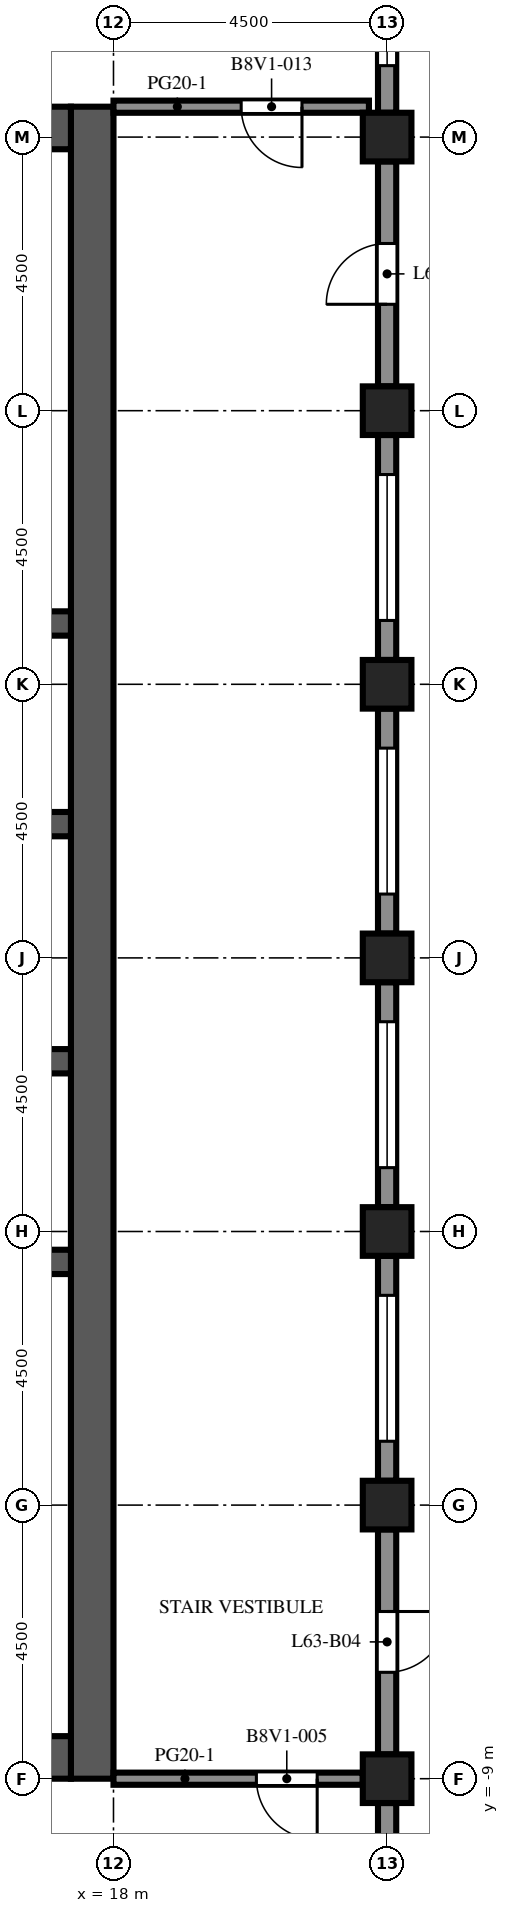
"""IFC4 building model, lengths in metres.
Left out: names, types, materials, properties, quantities, classifications, styles, units other than length and angle.
Written with IfcOpenShell. Run it as: python <this file> out.ifc"""

import sys

from ifc_helpers import new_model, si_unit, direction, frame, frame_2d, origin, origin_2d, place, context, subcontext, project, spatial, rectangle, extrude, element, fill, save


model = new_model("IFC4")
c1 = context("Model", 3, precision=1e-05, world=origin(), true_north=direction((0.0, 1.0)))
c2 = subcontext(c1, "Body", "Model", "MODEL_VIEW")
j1 = project(units=[si_unit("LENGTHUNIT", "METRE"), si_unit("PLANEANGLEUNIT", "RADIAN")], contexts=[c1])
p1 = place(None, origin())
s1 = spatial("IfcSite", under=j1, at=p1, CompositionType="ELEMENT")
p2 = place(p1, origin())
s2 = spatial("IfcBuilding", under=s1, at=p2, CompositionType="ELEMENT")
p3 = place(p2, frame((0.0, 0.0, 278.6)))
s3 = spatial("IfcBuildingStorey", under=s2, at=p3, CompositionType="ELEMENT", Elevation=278.6)
for number, where, z_axis, x_axis in (
    (1, (22.5, -9.0, 0.0), (0.0, 0.0, 1.0), (1.0, 0.0, 0.0)),
    (2, (22.5, -4.5, 0.0), (0.0, 0.0, 1.0), (1.0, 0.0, 0.0)),
    (3, (22.5, 0.0, 0.0), (0.0, 0.0, 1.0), (1.0, 0.0, 0.0)),
    (4, (22.5, 4.5, 0.0), (0.0, 0.0, 1.0), (1.0, 0.0, 0.0)),
    (5, (22.5, 9.0, 0.0), (0.0, 0.0, 1.0), (1.0, 0.0, 0.0)),
    (6, (22.5, 13.5, 0.0), (0.0, 0.0, 1.0), (1.0, 0.0, 0.0)),
    (7, (22.5, 18.0, 0.0), (0.0, 0.0, 1.0), (1.0, 0.0, 0.0)),
):
    element("IfcColumn", number, at=place(p3, frame(where, z_axis=z_axis, x_axis=x_axis)), inside=s3, PredefinedType="COLUMN", context=c2, shape_type="SweptSolid", body=[
        extrude(rectangle(XDim=0.8, YDim=0.8, at=origin_2d()), origin(), (0.0, 0.0, 1.0), 4.1),
    ])
p4 = place(p3, frame((17.65, -9.0, 0.0), z_axis=(0.0, 0.0, 1.0), x_axis=(0.0, 1.0, 0.0)))
e8 = element("IfcWall", 8, at=p4, inside=s3, PredefinedType="SHEAR", context=c2, shape_type="SweptSolid", body=[
    extrude(rectangle(XDim=27.5, YDim=0.7, at=frame_2d((13.75, 0.0))), origin(), (0.0, 0.0, 1.0), 4.1),
])
p5 = place(p4, frame((12.55, 0.0, 0.0)))
e9 = element("IfcOpeningElement", 9, at=p5, cuts=e8, PredefinedType="OPENING", context=c2, shape_type="SweptSolid", body=[
    extrude(rectangle(XDim=2.4, YDim=2.4, at=frame_2d((1.2, 1.2))), frame((0.0, 0.36, 0.0), z_axis=(0.0, -1.0, 0.0), x_axis=(1.0, 0.0, 0.0)), (0.0, 0.0, 1.0), 0.72),
])
p6 = place(p4, frame((6.825, 0.0, 0.0)))
e10 = element("IfcOpeningElement", 10, at=p6, cuts=e8, PredefinedType="OPENING", context=c2, shape_type="SweptSolid", body=[
    extrude(rectangle(XDim=1.2, YDim=2.1, at=frame_2d((0.6, 1.05))), frame((0.0, 0.36, 0.0), z_axis=(0.0, -1.0, 0.0), x_axis=(1.0, 0.0, 0.0)), (0.0, 0.0, 1.0), 0.72),
])
p7 = place(p4, frame((19.475, 0.0, 0.0)))
e11 = element("IfcOpeningElement", 11, at=p7, cuts=e8, PredefinedType="OPENING", context=c2, shape_type="SweptSolid", body=[
    extrude(rectangle(XDim=1.2, YDim=2.1, at=frame_2d((0.6, 1.05))), frame((0.0, 0.36, 0.0), z_axis=(0.0, -1.0, 0.0), x_axis=(1.0, 0.0, 0.0)), (0.0, 0.0, 1.0), 0.72),
])
for number, where, z_axis, x_axis in (
    (12, (6.7, -8.65, 0.0), (0.0, 0.0, 1.0), (1.0, 0.0, 0.0)),
    (13, (6.7, 18.15, 0.0), (0.0, 0.0, 1.0), (1.0, 0.0, 0.0)),
):
    element("IfcWall", number, at=place(p3, frame(where, z_axis=z_axis, x_axis=x_axis)), inside=s3, PredefinedType="SHEAR", context=c2, shape_type="SweptSolid", body=[
        extrude(rectangle(XDim=10.6, YDim=0.7, at=frame_2d((5.3, 0.0))), origin(), (0.0, 0.0, 1.0), 4.1),
    ])
p8 = place(p3, frame((6.7, -0.5, 0.0), z_axis=(0.0, 0.0, 1.0), x_axis=(1.0, 0.0, 0.0)))
e14 = element("IfcWall", 14, at=p8, inside=s3, PredefinedType="SHEAR", context=c2, shape_type="SweptSolid", body=[
    extrude(rectangle(XDim=10.6, YDim=0.4, at=frame_2d((5.3, 0.0))), origin(), (0.0, 0.0, 1.0), 4.1),
])
p9 = place(p3, frame((6.7, 2.8, 0.0), z_axis=(0.0, 0.0, 1.0), x_axis=(1.0, 0.0, 0.0)))
e15 = element("IfcWall", 15, at=p9, inside=s3, PredefinedType="SHEAR", context=c2, shape_type="SweptSolid", body=[
    extrude(rectangle(XDim=10.6, YDim=0.4, at=frame_2d((5.3, 0.0))), origin(), (0.0, 0.0, 1.0), 4.1),
])
p10 = place(p9, frame((0.688, 0.0, 0.0)))
e16 = element("IfcOpeningElement", 16, at=p10, cuts=e15, PredefinedType="OPENING", context=c2, shape_type="SweptSolid", body=[
    extrude(rectangle(XDim=1.1, YDim=2.1, at=frame_2d((0.55, 1.05))), frame((0.0, 0.21, 0.0), z_axis=(0.0, -1.0, 0.0), x_axis=(1.0, 0.0, 0.0)), (0.0, 0.0, 1.0), 0.42),
])
p11 = place(p9, frame((3.438, 0.0, 0.0)))
e17 = element("IfcOpeningElement", 17, at=p11, cuts=e15, PredefinedType="OPENING", context=c2, shape_type="SweptSolid", body=[
    extrude(rectangle(XDim=1.1, YDim=2.1, at=frame_2d((0.55, 1.05))), frame((0.0, 0.21, 0.0), z_axis=(0.0, -1.0, 0.0), x_axis=(1.0, 0.0, 0.0)), (0.0, 0.0, 1.0), 0.42),
])
p12 = place(p9, frame((6.113, 0.0, 0.0)))
e18 = element("IfcOpeningElement", 18, at=p12, cuts=e15, PredefinedType="OPENING", context=c2, shape_type="SweptSolid", body=[
    extrude(rectangle(XDim=1.0, YDim=2.1, at=frame_2d((0.5, 1.05))), frame((0.0, 0.21, 0.0), z_axis=(0.0, -1.0, 0.0), x_axis=(1.0, 0.0, 0.0)), (0.0, 0.0, 1.0), 0.42),
])
p13 = place(p9, frame((8.863, 0.0, 0.0)))
e19 = element("IfcOpeningElement", 19, at=p13, cuts=e15, PredefinedType="OPENING", context=c2, shape_type="SweptSolid", body=[
    extrude(rectangle(XDim=1.0, YDim=2.1, at=frame_2d((0.5, 1.05))), frame((0.0, 0.21, 0.0), z_axis=(0.0, -1.0, 0.0), x_axis=(1.0, 0.0, 0.0)), (0.0, 0.0, 1.0), 0.42),
])
p14 = place(p3, frame((6.7, 6.7, 0.0), z_axis=(0.0, 0.0, 1.0), x_axis=(1.0, 0.0, 0.0)))
e20 = element("IfcWall", 20, at=p14, inside=s3, PredefinedType="SHEAR", context=c2, shape_type="SweptSolid", body=[
    extrude(rectangle(XDim=10.6, YDim=0.4, at=frame_2d((5.3, 0.0))), origin(), (0.0, 0.0, 1.0), 4.1),
])
p15 = place(p14, frame((3.438, 0.0, 0.0)))
e21 = element("IfcOpeningElement", 21, at=p15, cuts=e20, PredefinedType="OPENING", context=c2, shape_type="SweptSolid", body=[
    extrude(rectangle(XDim=1.1, YDim=2.1, at=frame_2d((0.55, 1.05))), frame((0.0, 0.21, 0.0), z_axis=(0.0, -1.0, 0.0), x_axis=(1.0, 0.0, 0.0)), (0.0, 0.0, 1.0), 0.42),
])
p16 = place(p14, frame((6.062, 0.0, 0.0)))
e22 = element("IfcOpeningElement", 22, at=p16, cuts=e20, PredefinedType="OPENING", context=c2, shape_type="SweptSolid", body=[
    extrude(rectangle(XDim=1.1, YDim=2.1, at=frame_2d((0.55, 1.05))), frame((0.0, 0.21, 0.0), z_axis=(0.0, -1.0, 0.0), x_axis=(1.0, 0.0, 0.0)), (0.0, 0.0, 1.0), 0.42),
])
p17 = place(p14, frame((8.812, 0.0, 0.0)))
e23 = element("IfcOpeningElement", 23, at=p17, cuts=e20, PredefinedType="OPENING", context=c2, shape_type="SweptSolid", body=[
    extrude(rectangle(XDim=1.1, YDim=2.1, at=frame_2d((0.55, 1.05))), frame((0.0, 0.21, 0.0), z_axis=(0.0, -1.0, 0.0), x_axis=(1.0, 0.0, 0.0)), (0.0, 0.0, 1.0), 0.42),
])
p18 = place(p14, frame((0.738, 0.0, 0.0)))
e24 = element("IfcOpeningElement", 24, at=p18, cuts=e20, PredefinedType="OPENING", context=c2, shape_type="SweptSolid", body=[
    extrude(rectangle(XDim=1.0, YDim=2.1, at=frame_2d((0.5, 1.05))), frame((0.0, 0.21, 0.0), z_axis=(0.0, -1.0, 0.0), x_axis=(1.0, 0.0, 0.0)), (0.0, 0.0, 1.0), 0.42),
])
p19 = place(p3, frame((6.7, 10.0, 0.0), z_axis=(0.0, 0.0, 1.0), x_axis=(1.0, 0.0, 0.0)))
e25 = element("IfcWall", 25, at=p19, inside=s3, PredefinedType="SHEAR", context=c2, shape_type="SweptSolid", body=[
    extrude(rectangle(XDim=10.6, YDim=0.4, at=frame_2d((5.3, 0.0))), origin(), (0.0, 0.0, 1.0), 4.1),
])
p20 = place(p3, frame((22.5, -9.4, 0.0), z_axis=(0.0, 0.0, 1.0), x_axis=(0.0, -1.0, 0.0)))
e26 = element("IfcWall", 26, at=p20, inside=s3, PredefinedType="SOLIDWALL", context=c2, shape_type="SweptSolid", body=[
    extrude(rectangle(XDim=3.7, YDim=0.3, at=frame_2d((1.85, 0.0))), origin(), (0.0, 0.0, 1.0), 2.85),
])
p21 = place(p20, frame((0.65, 0.0, 0.8)))
e27 = element("IfcOpeningElement", 27, at=p21, cuts=e26, PredefinedType="OPENING", context=c2, shape_type="SweptSolid", body=[
    extrude(rectangle(XDim=2.4, YDim=1.7, at=frame_2d((1.2, 0.85))), frame((0.0, 0.16, 0.0), z_axis=(0.0, -1.0, 0.0), x_axis=(1.0, 0.0, 0.0)), (0.0, 0.0, 1.0), 0.32),
])
p22 = place(p3, frame((22.5, -4.9, 0.0), z_axis=(0.0, 0.0, 1.0), x_axis=(0.0, -1.0, 0.0)))
e28 = element("IfcWall", 28, at=p22, inside=s3, PredefinedType="SOLIDWALL", context=c2, shape_type="SweptSolid", body=[
    extrude(rectangle(XDim=3.7, YDim=0.3, at=frame_2d((1.85, 0.0))), origin(), (0.0, 0.0, 1.0), 2.85),
])
p23 = place(p22, frame((1.35, 0.0, 0.0)))
e29 = element("IfcOpeningElement", 29, at=p23, cuts=e28, PredefinedType="OPENING", context=c2, shape_type="SweptSolid", body=[
    extrude(rectangle(XDim=1.0, YDim=2.2, at=frame_2d((0.5, 1.1))), frame((0.0, 0.16, 0.0), z_axis=(0.0, -1.0, 0.0), x_axis=(1.0, 0.0, 0.0)), (0.0, 0.0, 1.0), 0.32),
])
p24 = place(p3, frame((22.5, -0.4, 0.0), z_axis=(0.0, 0.0, 1.0), x_axis=(0.0, -1.0, 0.0)))
e30 = element("IfcWall", 30, at=p24, inside=s3, PredefinedType="SOLIDWALL", context=c2, shape_type="SweptSolid", body=[
    extrude(rectangle(XDim=3.7, YDim=0.3, at=frame_2d((1.85, 0.0))), origin(), (0.0, 0.0, 1.0), 2.85),
])
p25 = place(p24, frame((0.65, 0.0, 0.8)))
e31 = element("IfcOpeningElement", 31, at=p25, cuts=e30, PredefinedType="OPENING", context=c2, shape_type="SweptSolid", body=[
    extrude(rectangle(XDim=2.4, YDim=1.7, at=frame_2d((1.2, 0.85))), frame((0.0, 0.16, 0.0), z_axis=(0.0, -1.0, 0.0), x_axis=(1.0, 0.0, 0.0)), (0.0, 0.0, 1.0), 0.32),
])
p26 = place(p3, frame((22.5, 4.1, 0.0), z_axis=(0.0, 0.0, 1.0), x_axis=(0.0, -1.0, 0.0)))
e32 = element("IfcWall", 32, at=p26, inside=s3, PredefinedType="SOLIDWALL", context=c2, shape_type="SweptSolid", body=[
    extrude(rectangle(XDim=3.7, YDim=0.3, at=frame_2d((1.85, 0.0))), origin(), (0.0, 0.0, 1.0), 2.85),
])
p27 = place(p26, frame((0.65, 0.0, 0.8)))
e33 = element("IfcOpeningElement", 33, at=p27, cuts=e32, PredefinedType="OPENING", context=c2, shape_type="SweptSolid", body=[
    extrude(rectangle(XDim=2.4, YDim=1.7, at=frame_2d((1.2, 0.85))), frame((0.0, 0.16, 0.0), z_axis=(0.0, -1.0, 0.0), x_axis=(1.0, 0.0, 0.0)), (0.0, 0.0, 1.0), 0.32),
])
p28 = place(p3, frame((22.5, 8.6, 0.0), z_axis=(0.0, 0.0, 1.0), x_axis=(0.0, -1.0, 0.0)))
e34 = element("IfcWall", 34, at=p28, inside=s3, PredefinedType="SOLIDWALL", context=c2, shape_type="SweptSolid", body=[
    extrude(rectangle(XDim=3.7, YDim=0.3, at=frame_2d((1.85, 0.0))), origin(), (0.0, 0.0, 1.0), 2.85),
])
p29 = place(p28, frame((0.65, 0.0, 0.8)))
e35 = element("IfcOpeningElement", 35, at=p29, cuts=e34, PredefinedType="OPENING", context=c2, shape_type="SweptSolid", body=[
    extrude(rectangle(XDim=2.4, YDim=1.7, at=frame_2d((1.2, 0.85))), frame((0.0, 0.16, 0.0), z_axis=(0.0, -1.0, 0.0), x_axis=(1.0, 0.0, 0.0)), (0.0, 0.0, 1.0), 0.32),
])
p30 = place(p3, frame((22.5, 13.1, 0.0), z_axis=(0.0, 0.0, 1.0), x_axis=(0.0, -1.0, 0.0)))
e36 = element("IfcWall", 36, at=p30, inside=s3, PredefinedType="SOLIDWALL", context=c2, shape_type="SweptSolid", body=[
    extrude(rectangle(XDim=3.7, YDim=0.3, at=frame_2d((1.85, 0.0))), origin(), (0.0, 0.0, 1.0), 2.85),
])
p31 = place(p30, frame((0.65, 0.0, 0.8)))
e37 = element("IfcOpeningElement", 37, at=p31, cuts=e36, PredefinedType="OPENING", context=c2, shape_type="SweptSolid", body=[
    extrude(rectangle(XDim=2.4, YDim=1.7, at=frame_2d((1.2, 0.85))), frame((0.0, 0.16, 0.0), z_axis=(0.0, -1.0, 0.0), x_axis=(1.0, 0.0, 0.0)), (0.0, 0.0, 1.0), 0.32),
])
p32 = place(p3, frame((22.5, 17.6, 0.0), z_axis=(0.0, 0.0, 1.0), x_axis=(0.0, -1.0, 0.0)))
e38 = element("IfcWall", 38, at=p32, inside=s3, PredefinedType="SOLIDWALL", context=c2, shape_type="SweptSolid", body=[
    extrude(rectangle(XDim=3.7, YDim=0.3, at=frame_2d((1.85, 0.0))), origin(), (0.0, 0.0, 1.0), 2.85),
])
p33 = place(p32, frame((1.35, 0.0, 0.0)))
e39 = element("IfcOpeningElement", 39, at=p33, cuts=e38, PredefinedType="OPENING", context=c2, shape_type="SweptSolid", body=[
    extrude(rectangle(XDim=1.0, YDim=2.2, at=frame_2d((0.5, 1.1))), frame((0.0, 0.16, 0.0), z_axis=(0.0, -1.0, 0.0), x_axis=(1.0, 0.0, 0.0)), (0.0, 0.0, 1.0), 0.32),
])
p34 = place(p3, frame((22.5, 22.1, 0.0), z_axis=(0.0, 0.0, 1.0), x_axis=(0.0, -1.0, 0.0)))
e40 = element("IfcWall", 40, at=p34, inside=s3, PredefinedType="SOLIDWALL", context=c2, shape_type="SweptSolid", body=[
    extrude(rectangle(XDim=3.7, YDim=0.3, at=frame_2d((1.85, 0.0))), origin(), (0.0, 0.0, 1.0), 2.85),
])
p35 = place(p34, frame((0.525, 0.0, 0.8)))
e41 = element("IfcOpeningElement", 41, at=p35, cuts=e40, PredefinedType="OPENING", context=c2, shape_type="SweptSolid", body=[
    extrude(rectangle(XDim=2.4, YDim=1.7, at=frame_2d((1.2, 0.85))), frame((0.0, 0.16, 0.0), z_axis=(0.0, -1.0, 0.0), x_axis=(1.0, 0.0, 0.0)), (0.0, 0.0, 1.0), 0.32),
])
p36 = place(p3, frame((22.1, -9.0, 0.0), z_axis=(0.0, 0.0, 1.0), x_axis=(-1.0, 0.0, 0.0)))
e42 = element("IfcWall", 42, at=p36, inside=s3, PredefinedType="PARTITIONING", context=c2, shape_type="SweptSolid", body=[
    extrude(rectangle(XDim=4.1, YDim=0.2, at=frame_2d((2.05, 0.0))), origin(), (0.0, 0.0, 1.0), 3.65),
])
p37 = place(p36, frame((0.75, 0.0, 0.0)))
e43 = element("IfcOpeningElement", 43, at=p37, cuts=e42, PredefinedType="OPENING", context=c2, shape_type="SweptSolid", body=[
    extrude(rectangle(XDim=1.0, YDim=2.1, at=frame_2d((0.5, 1.05))), frame((0.0, 0.11, 0.0), z_axis=(0.0, -1.0, 0.0), x_axis=(1.0, 0.0, 0.0)), (0.0, 0.0, 1.0), 0.22),
])
p38 = place(p3, frame((18.0, 18.5, 0.0), z_axis=(0.0, 0.0, 1.0), x_axis=(1.0, 0.0, 0.0)))
e44 = element("IfcWall", 44, at=p38, inside=s3, PredefinedType="PARTITIONING", context=c2, shape_type="SweptSolid", body=[
    extrude(rectangle(XDim=4.201, YDim=0.2, at=frame_2d((2.101, 0.0))), origin(), (0.0, 0.0, 1.0), 3.65),
])
p39 = place(p38, frame((2.1, 0.0, 0.0)))
e45 = element("IfcOpeningElement", 45, at=p39, cuts=e44, PredefinedType="OPENING", context=c2, shape_type="SweptSolid", body=[
    extrude(rectangle(XDim=1.0, YDim=2.1, at=frame_2d((0.5, 1.05))), frame((0.0, 0.11, 0.0), z_axis=(0.0, -1.0, 0.0), x_axis=(1.0, 0.0, 0.0)), (0.0, 0.0, 1.0), 0.22),
])
p40 = place(p23, origin())
e46 = element("IfcDoor", 46, at=p40, inside=s3, OperationType="SINGLE_SWING_LEFT", PredefinedType="DOOR", context=c2, shape_type="SweptSolid", body=[
    extrude(rectangle(XDim=1.0, YDim=2.2, at=frame_2d((0.5, 1.1))), frame((0.0, 0.025, 0.0), z_axis=(0.0, -1.0, 0.0), x_axis=(1.0, 0.0, 0.0)), (0.0, 0.0, 1.0), 0.05),
])
fill(e29, e46)
p41 = place(p25, origin())
e47 = element("IfcWindow", 47, at=p41, inside=s3, PartitioningType="SINGLE_PANEL", PredefinedType="WINDOW", context=c2, shape_type="SweptSolid", body=[
    extrude(rectangle(XDim=2.4, YDim=1.7, at=frame_2d((1.2, 0.85))), frame((0.0, 0.03, 0.0), z_axis=(0.0, -1.0, 0.0), x_axis=(1.0, 0.0, 0.0)), (0.0, 0.0, 1.0), 0.06),
])
fill(e31, e47)
p42 = place(p27, origin())
e48 = element("IfcWindow", 48, at=p42, inside=s3, PartitioningType="SINGLE_PANEL", PredefinedType="WINDOW", context=c2, shape_type="SweptSolid", body=[
    extrude(rectangle(XDim=2.4, YDim=1.7, at=frame_2d((1.2, 0.85))), frame((0.0, 0.03, 0.0), z_axis=(0.0, -1.0, 0.0), x_axis=(1.0, 0.0, 0.0)), (0.0, 0.0, 1.0), 0.06),
])
fill(e33, e48)
p43 = place(p29, origin())
e49 = element("IfcWindow", 49, at=p43, inside=s3, PartitioningType="SINGLE_PANEL", PredefinedType="WINDOW", context=c2, shape_type="SweptSolid", body=[
    extrude(rectangle(XDim=2.4, YDim=1.7, at=frame_2d((1.2, 0.85))), frame((0.0, 0.03, 0.0), z_axis=(0.0, -1.0, 0.0), x_axis=(1.0, 0.0, 0.0)), (0.0, 0.0, 1.0), 0.06),
])
fill(e35, e49)
p44 = place(p31, origin())
e50 = element("IfcWindow", 50, at=p44, inside=s3, PartitioningType="SINGLE_PANEL", PredefinedType="WINDOW", context=c2, shape_type="SweptSolid", body=[
    extrude(rectangle(XDim=2.4, YDim=1.7, at=frame_2d((1.2, 0.85))), frame((0.0, 0.03, 0.0), z_axis=(0.0, -1.0, 0.0), x_axis=(1.0, 0.0, 0.0)), (0.0, 0.0, 1.0), 0.06),
])
fill(e37, e50)
p45 = place(p33, origin())
e51 = element("IfcDoor", 51, at=p45, inside=s3, OperationType="SINGLE_SWING_RIGHT", PredefinedType="DOOR", context=c2, shape_type="SweptSolid", body=[
    extrude(rectangle(XDim=1.0, YDim=2.2, at=frame_2d((0.5, 1.1))), frame((0.0, 0.025, 0.0), z_axis=(0.0, -1.0, 0.0), x_axis=(1.0, 0.0, 0.0)), (0.0, 0.0, 1.0), 0.05),
])
fill(e39, e51)
p46 = place(p35, origin())
e52 = element("IfcWindow", 52, at=p46, inside=s3, PartitioningType="SINGLE_PANEL", PredefinedType="WINDOW", context=c2, shape_type="SweptSolid", body=[
    extrude(rectangle(XDim=2.4, YDim=1.7, at=frame_2d((1.2, 0.85))), frame((0.0, 0.03, 0.0), z_axis=(0.0, -1.0, 0.0), x_axis=(1.0, 0.0, 0.0)), (0.0, 0.0, 1.0), 0.06),
])
fill(e41, e52)
p47 = place(p5, origin())
e53 = element("IfcDoor", 53, at=p47, inside=s3, OperationType="DOUBLE_DOOR_DOUBLE_SWING", PredefinedType="DOOR", context=c2, shape_type="SweptSolid", body=[
    extrude(rectangle(XDim=2.4, YDim=2.4, at=frame_2d((1.2, 1.2))), frame((0.0, 0.025, 0.0), z_axis=(0.0, -1.0, 0.0), x_axis=(1.0, 0.0, 0.0)), (0.0, 0.0, 1.0), 0.05),
])
fill(e9, e53)
p48 = place(p6, frame((1.2, 0.0, 0.0), z_axis=(0.0, 0.0, 1.0), x_axis=(-1.0, 0.0, 0.0)))
e54 = element("IfcDoor", 54, at=p48, inside=s3, OperationType="SINGLE_SWING_LEFT", PredefinedType="DOOR", context=c2, shape_type="SweptSolid", body=[
    extrude(rectangle(XDim=1.2, YDim=2.1, at=frame_2d((0.6, 1.05))), frame((0.0, 0.025, 0.0), z_axis=(0.0, -1.0, 0.0), x_axis=(1.0, 0.0, 0.0)), (0.0, 0.0, 1.0), 0.05),
])
fill(e10, e54)
p49 = place(p7, frame((1.2, 0.0, 0.0), z_axis=(0.0, 0.0, 1.0), x_axis=(-1.0, 0.0, 0.0)))
e55 = element("IfcDoor", 55, at=p49, inside=s3, OperationType="SINGLE_SWING_LEFT", PredefinedType="DOOR", context=c2, shape_type="SweptSolid", body=[
    extrude(rectangle(XDim=1.2, YDim=2.1, at=frame_2d((0.6, 1.05))), frame((0.0, 0.025, 0.0), z_axis=(0.0, -1.0, 0.0), x_axis=(1.0, 0.0, 0.0)), (0.0, 0.0, 1.0), 0.05),
])
fill(e11, e55)
p50 = place(p37, origin())
e56 = element("IfcDoor", 56, at=p50, inside=s3, OperationType="SINGLE_SWING_LEFT", PredefinedType="DOOR", context=c2, shape_type="SweptSolid", body=[
    extrude(rectangle(XDim=1.0, YDim=2.1, at=frame_2d((0.5, 1.05))), frame((0.0, 0.025, 0.0), z_axis=(0.0, -1.0, 0.0), x_axis=(1.0, 0.0, 0.0)), (0.0, 0.0, 1.0), 0.05),
])
fill(e43, e56)
p51 = place(p39, origin())
e57 = element("IfcDoor", 57, at=p51, inside=s3, OperationType="SINGLE_SWING_RIGHT", PredefinedType="DOOR", context=c2, shape_type="SweptSolid", body=[
    extrude(rectangle(XDim=1.0, YDim=2.1, at=frame_2d((0.5, 1.05))), frame((0.0, 0.025, 0.0), z_axis=(0.0, -1.0, 0.0), x_axis=(1.0, 0.0, 0.0)), (0.0, 0.0, 1.0), 0.05),
])
fill(e45, e57)
save(model, sys.argv[1])
